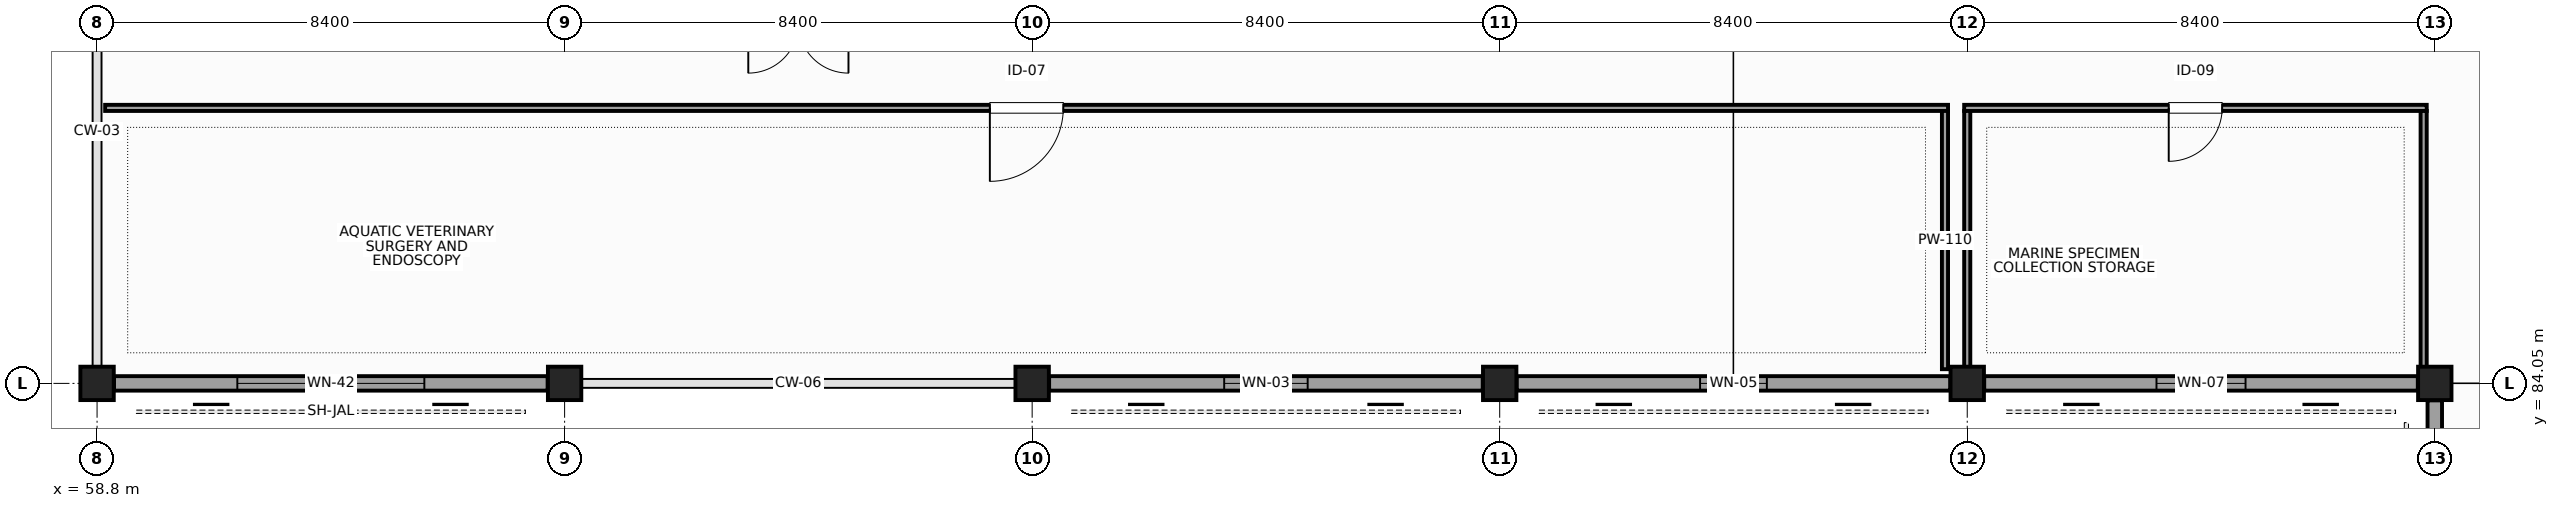
"""IFC4 building model, lengths in metres.
Left out: names, types, materials, properties, quantities, classifications, styles, units other than length and angle.
Written with IfcOpenShell. Run it as: python <this file> out.ifc"""

import sys

from ifc_helpers import new_model, si_unit, direction, frame, frame_2d, origin, origin_2d, place, context, subcontext, project, spatial, rectangle, extrude, element, fill, save


model = new_model("IFC4")
c1 = context("Model", 3, precision=1e-05, world=origin(), true_north=direction((0.0, 1.0)))
c2 = subcontext(c1, "Body", "Model", "MODEL_VIEW")
j1 = project(units=[si_unit("LENGTHUNIT", "METRE"), si_unit("PLANEANGLEUNIT", "RADIAN")], contexts=[c1])
p1 = place(None, origin())
s1 = spatial("IfcSite", under=j1, at=p1, CompositionType="ELEMENT")
p2 = place(p1, origin())
s2 = spatial("IfcBuilding", under=s1, at=p2, CompositionType="ELEMENT")
p3 = place(p2, frame((0.0, 0.0, 10.8)))
s3 = spatial("IfcBuildingStorey", under=s2, at=p3, CompositionType="ELEMENT", Elevation=10.8)
for number, where, z_axis, x_axis in (
    (1, (58.8, 84.05, 0.0), (0.0, 0.0, 1.0), (1.0, 0.0, 0.0)),
    (2, (67.2, 84.05, 0.0), (0.0, 0.0, 1.0), (1.0, 0.0, 0.0)),
    (3, (75.6, 84.05, 0.0), (0.0, 0.0, 1.0), (1.0, 0.0, 0.0)),
    (4, (84.0, 84.05, 0.0), (0.0, 0.0, 1.0), (1.0, 0.0, 0.0)),
    (5, (92.4, 84.05, 0.0), (0.0, 0.0, 1.0), (1.0, 0.0, 0.0)),
    (6, (100.8, 84.05, 0.0), (0.0, 0.0, 1.0), (1.0, 0.0, 0.0)),
):
    element("IfcColumn", number, at=place(p3, frame(where, z_axis=z_axis, x_axis=x_axis)), inside=s3, PredefinedType="COLUMN", context=c2, shape_type="SweptSolid", body=[
        extrude(rectangle(XDim=0.6, YDim=0.6, at=origin_2d()), origin(), (0.0, 0.0, 1.0), 4.8),
    ])
p4 = place(p3, frame((59.105, 84.05, 0.0), z_axis=(0.0, 0.0, 1.0), x_axis=(1.0, 0.0, 0.0)))
e7 = element("IfcWall", 7, at=p4, inside=s3, PredefinedType="STANDARD", context=c2, shape_type="SweptSolid", body=[
    extrude(rectangle(XDim=7.79, YDim=0.26, at=frame_2d((3.895, 0.0))), origin(), (0.0, 0.0, 1.0), 3.63),
])
p5 = place(p4, frame((2.215, 0.0, 0.95)))
e8 = element("IfcOpeningElement", 8, at=p5, cuts=e7, PredefinedType="OPENING", context=c2, shape_type="SweptSolid", body=[
    extrude(rectangle(XDim=3.36, YDim=1.96, at=frame_2d((1.68, 0.98))), frame((0.0, 0.14, 0.0), z_axis=(0.0, -1.0, 0.0), x_axis=(1.0, 0.0, 0.0)), (0.0, 0.0, 1.0), 0.28),
])
p6 = place(p3, frame((75.905, 84.05, 0.0), z_axis=(0.0, 0.0, 1.0), x_axis=(1.0, 0.0, 0.0)))
e9 = element("IfcWall", 9, at=p6, inside=s3, PredefinedType="STANDARD", context=c2, shape_type="SweptSolid", body=[
    extrude(rectangle(XDim=7.79, YDim=0.26, at=frame_2d((3.895, 0.0))), origin(), (0.0, 0.0, 1.0), 3.63),
])
p7 = place(p6, frame((3.145, 0.0, 0.95)))
e10 = element("IfcOpeningElement", 10, at=p7, cuts=e9, PredefinedType="OPENING", context=c2, shape_type="SweptSolid", body=[
    extrude(rectangle(XDim=1.5, YDim=2.1, at=frame_2d((0.75, 1.05))), frame((0.0, 0.14, 0.0), z_axis=(0.0, -1.0, 0.0), x_axis=(1.0, 0.0, 0.0)), (0.0, 0.0, 1.0), 0.28),
])
p8 = place(p3, frame((84.305, 84.05, 0.0), z_axis=(0.0, 0.0, 1.0), x_axis=(1.0, 0.0, 0.0)))
e11 = element("IfcWall", 11, at=p8, inside=s3, PredefinedType="STANDARD", context=c2, shape_type="SweptSolid", body=[
    extrude(rectangle(XDim=7.79, YDim=0.26, at=frame_2d((3.895, 0.0))), origin(), (0.0, 0.0, 1.0), 3.63),
])
p9 = place(p8, frame((3.295, 0.0, 0.95)))
e12 = element("IfcOpeningElement", 12, at=p9, cuts=e11, PredefinedType="OPENING", context=c2, shape_type="SweptSolid", body=[
    extrude(rectangle(XDim=1.2, YDim=1.8, at=frame_2d((0.6, 0.9))), frame((0.0, 0.14, 0.0), z_axis=(0.0, -1.0, 0.0), x_axis=(1.0, 0.0, 0.0)), (0.0, 0.0, 1.0), 0.28),
])
p10 = place(p3, frame((92.705, 84.05, 0.0), z_axis=(0.0, 0.0, 1.0), x_axis=(1.0, 0.0, 0.0)))
e13 = element("IfcWall", 13, at=p10, inside=s3, PredefinedType="STANDARD", context=c2, shape_type="SweptSolid", body=[
    extrude(rectangle(XDim=7.79, YDim=0.26, at=frame_2d((3.895, 0.0))), origin(), (0.0, 0.0, 1.0), 3.63),
])
p11 = place(p10, frame((3.095, 0.0, 0.95)))
e14 = element("IfcOpeningElement", 14, at=p11, cuts=e13, PredefinedType="OPENING", context=c2, shape_type="SweptSolid", body=[
    extrude(rectangle(XDim=1.6, YDim=2.2, at=frame_2d((0.8, 1.1))), frame((0.0, 0.14, 0.0), z_axis=(0.0, -1.0, 0.0), x_axis=(1.0, 0.0, 0.0)), (0.0, 0.0, 1.0), 0.28),
])
p12 = place(p3, frame((100.8, 83.745, 0.0), z_axis=(0.0, 0.0, 1.0), x_axis=(0.0, -1.0, 0.0)))
e15 = element("IfcWall", 15, at=p12, inside=s3, PredefinedType="STANDARD", context=c2, shape_type="SweptSolid", body=[
    extrude(rectangle(XDim=8.44, YDim=0.26, at=frame_2d((4.22, 0.0))), origin(), (0.0, 0.0, 1.0), 4.5),
])
p13 = place(p12, frame((3.17, 0.0, 0.95)))
e16 = element("IfcOpeningElement", 16, at=p13, cuts=e15, PredefinedType="OPENING", context=c2, shape_type="SweptSolid", body=[
    extrude(rectangle(XDim=2.1, YDim=2.1, at=frame_2d((1.05, 1.05))), frame((0.0, 0.14, 0.0), z_axis=(0.0, -1.0, 0.0), x_axis=(1.0, 0.0, 0.0)), (0.0, 0.0, 1.0), 0.28),
])
p14 = place(p3, frame((58.945, 89.0, 0.0), z_axis=(0.0, 0.0, 1.0), x_axis=(1.0, 0.0, 0.0)))
e17 = element("IfcWall", 17, at=p14, inside=s3, PredefinedType="PARTITIONING", context=c2, shape_type="SweptSolid", body=[
    extrude(rectangle(XDim=33.11, YDim=0.11, at=frame_2d((16.555, 0.0))), origin(), (0.0, 0.0, 1.0), 2.31),
])
p15 = place(p14, frame((15.895, 0.0, 0.0)))
e18 = element("IfcOpeningElement", 18, at=p15, cuts=e17, PredefinedType="OPENING", context=c2, shape_type="SweptSolid", body=[
    extrude(rectangle(XDim=1.32, YDim=2.25, at=frame_2d((0.66, 1.125))), frame((0.0, 0.065, 0.0), z_axis=(0.0, -1.0, 0.0), x_axis=(1.0, 0.0, 0.0)), (0.0, 0.0, 1.0), 0.13),
])
p16 = place(p3, frame((92.0, 84.305, 0.0), z_axis=(0.0, 0.0, 1.0), x_axis=(0.0, 1.0, 0.0)))
e19 = element("IfcWall", 19, at=p16, inside=s3, PredefinedType="PARTITIONING", context=c2, shape_type="SweptSolid", body=[
    extrude(rectangle(XDim=4.64, YDim=0.11, at=frame_2d((2.32, 0.0))), origin(), (0.0, 0.0, 1.0), 3.63),
])
p17 = place(p3, frame((92.345, 89.0, 0.0), z_axis=(0.0, 0.0, 1.0), x_axis=(1.0, 0.0, 0.0)))
e20 = element("IfcWall", 20, at=p17, inside=s3, PredefinedType="PARTITIONING", context=c2, shape_type="SweptSolid", body=[
    extrude(rectangle(XDim=8.31, YDim=0.11, at=frame_2d((4.155, 0.0))), origin(), (0.0, 0.0, 1.0), 3.75),
])
p18 = place(p17, frame((3.675, 0.0, 0.0)))
e21 = element("IfcOpeningElement", 21, at=p18, cuts=e20, PredefinedType="OPENING", context=c2, shape_type="SweptSolid", body=[
    extrude(rectangle(XDim=0.96, YDim=2.2, at=frame_2d((0.48, 1.1))), frame((0.0, 0.065, 0.0), z_axis=(0.0, -1.0, 0.0), x_axis=(1.0, 0.0, 0.0)), (0.0, 0.0, 1.0), 0.13),
])
for number, where, z_axis, x_axis in (
    (22, (100.6, 84.305, 0.0), (0.0, 0.0, 1.0), (0.0, 1.0, 0.0)),
    (23, (92.4, 84.305, 0.0), (0.0, 0.0, 1.0), (0.0, 1.0, 0.0)),
):
    element("IfcWall", number, at=place(p3, frame(where, z_axis=z_axis, x_axis=x_axis)), inside=s3, PredefinedType="PARTITIONING", context=c2, shape_type="SweptSolid", body=[
        extrude(rectangle(XDim=4.64, YDim=0.11, at=frame_2d((2.32, 0.0))), origin(), (0.0, 0.0, 1.0), 3.63),
    ])
p19 = place(p5, origin())
e24 = element("IfcWindow", 24, at=p19, inside=s3, PartitioningType="SINGLE_PANEL", PredefinedType="WINDOW", context=c2, shape_type="SweptSolid", body=[
    extrude(rectangle(XDim=3.36, YDim=1.96, at=frame_2d((1.68, 0.98))), frame((0.0, 0.03, 0.0), z_axis=(0.0, -1.0, 0.0), x_axis=(1.0, 0.0, 0.0)), (0.0, 0.0, 1.0), 0.06),
])
fill(e8, e24)
p20 = place(p7, origin())
e25 = element("IfcWindow", 25, at=p20, inside=s3, PartitioningType="SINGLE_PANEL", PredefinedType="WINDOW", context=c2, shape_type="SweptSolid", body=[
    extrude(rectangle(XDim=1.5, YDim=2.1, at=frame_2d((0.75, 1.05))), frame((0.0, 0.03, 0.0), z_axis=(0.0, -1.0, 0.0), x_axis=(1.0, 0.0, 0.0)), (0.0, 0.0, 1.0), 0.06),
])
fill(e10, e25)
p21 = place(p9, origin())
e26 = element("IfcWindow", 26, at=p21, inside=s3, PartitioningType="SINGLE_PANEL", PredefinedType="WINDOW", context=c2, shape_type="SweptSolid", body=[
    extrude(rectangle(XDim=1.2, YDim=1.8, at=frame_2d((0.6, 0.9))), frame((0.0, 0.03, 0.0), z_axis=(0.0, -1.0, 0.0), x_axis=(1.0, 0.0, 0.0)), (0.0, 0.0, 1.0), 0.06),
])
fill(e12, e26)
p22 = place(p11, origin())
e27 = element("IfcWindow", 27, at=p22, inside=s3, PartitioningType="SINGLE_PANEL", PredefinedType="WINDOW", context=c2, shape_type="SweptSolid", body=[
    extrude(rectangle(XDim=1.6, YDim=2.2, at=frame_2d((0.8, 1.1))), frame((0.0, 0.03, 0.0), z_axis=(0.0, -1.0, 0.0), x_axis=(1.0, 0.0, 0.0)), (0.0, 0.0, 1.0), 0.06),
])
fill(e14, e27)
p23 = place(p15, frame((1.32, 0.0, 0.0), z_axis=(0.0, 0.0, 1.0), x_axis=(-1.0, 0.0, 0.0)))
e28 = element("IfcDoor", 28, at=p23, inside=s3, OperationType="SINGLE_SWING_RIGHT", PredefinedType="DOOR", context=c2, shape_type="SweptSolid", body=[
    extrude(rectangle(XDim=1.32, YDim=2.25, at=frame_2d((0.66, 1.125))), frame((0.0, 0.025, 0.0), z_axis=(0.0, -1.0, 0.0), x_axis=(1.0, 0.0, 0.0)), (0.0, 0.0, 1.0), 0.05),
])
fill(e18, e28)
p24 = place(p18, frame((0.96, 0.0, 0.0), z_axis=(0.0, 0.0, 1.0), x_axis=(-1.0, 0.0, 0.0)))
e29 = element("IfcDoor", 29, at=p24, inside=s3, OperationType="SINGLE_SWING_RIGHT", PredefinedType="DOOR", context=c2, shape_type="SweptSolid", body=[
    extrude(rectangle(XDim=0.96, YDim=2.2, at=frame_2d((0.48, 1.1))), frame((0.0, 0.025, 0.0), z_axis=(0.0, -1.0, 0.0), x_axis=(1.0, 0.0, 0.0)), (0.0, 0.0, 1.0), 0.05),
])
fill(e21, e29)
save(model, sys.argv[1])
